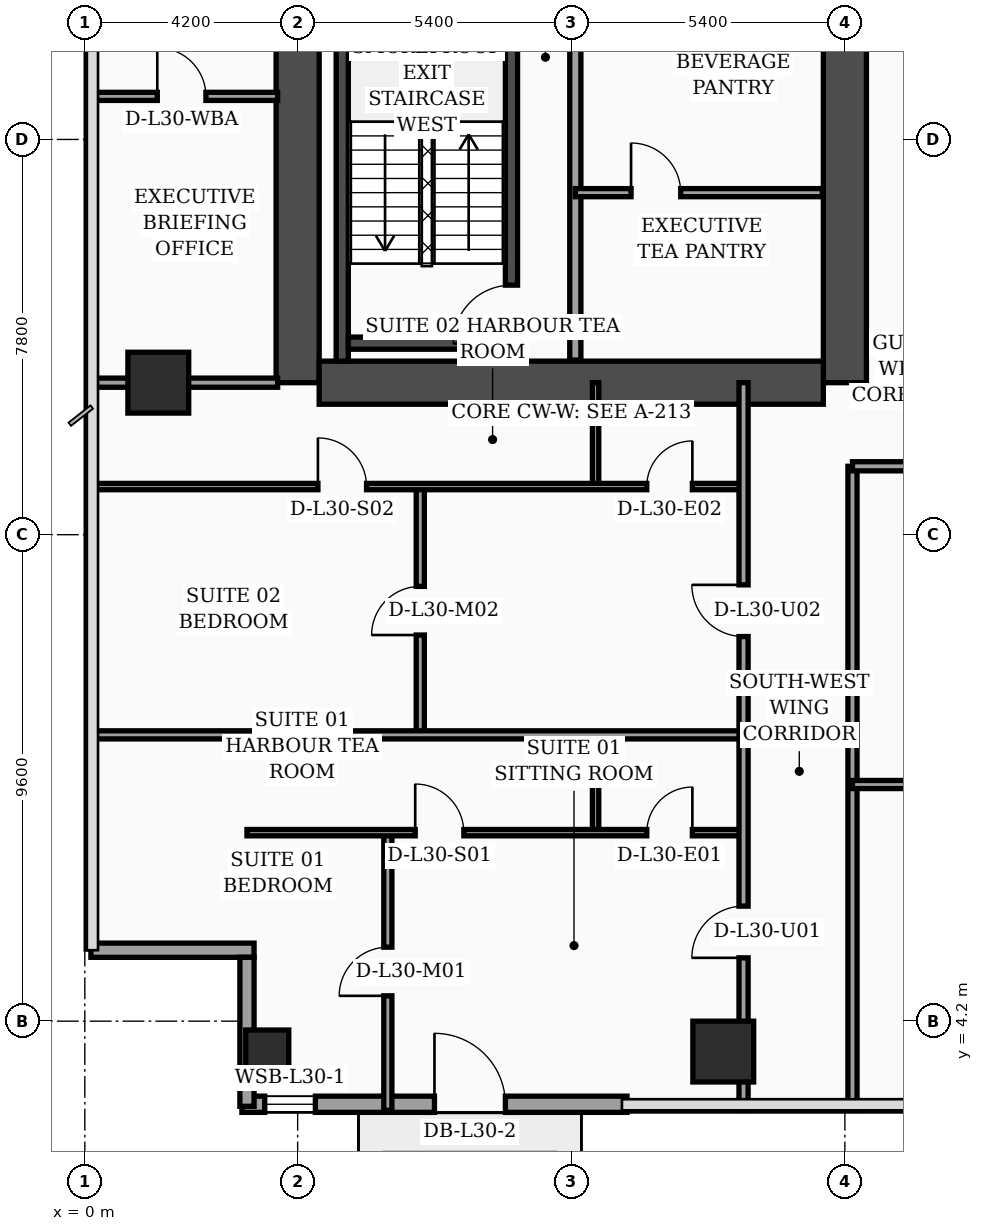
"""IFC4 building model, lengths in metres.
Left out: names, types, materials, properties, quantities, classifications, styles, units other than length and angle.
Written with IfcOpenShell. Run it as: python <this file> out.ifc"""

import sys

from ifc_helpers import new_model, si_unit, direction, frame, frame_2d, origin, origin_2d, place, context, subcontext, project, spatial, rectangle, hollow_rectangle, extrude, element, fill, save


model = new_model("IFC4")
c1 = context("Model", 3, precision=1e-05, world=origin(), true_north=direction((0.0, 1.0)))
c2 = subcontext(c1, "Body", "Model", "MODEL_VIEW")
j1 = project(units=[si_unit("LENGTHUNIT", "METRE"), si_unit("PLANEANGLEUNIT", "RADIAN")], contexts=[c1])
p1 = place(None, origin())
s1 = spatial("IfcSite", under=j1, at=p1, CompositionType="ELEMENT")
p2 = place(p1, origin())
s2 = spatial("IfcBuilding", under=s1, at=p2, CompositionType="ELEMENT")
p3 = place(p2, frame((0.0, 0.0, 124.0)))
s3 = spatial("IfcBuildingStorey", under=s2, at=p3, CompositionType="ELEMENT", Elevation=124.0)
p4 = place(p3, frame((4.2, 16.8, 0.0), z_axis=(0.0, 0.0, 1.0), x_axis=(0.0, 1.0, 0.0)))
e1 = element("IfcWall", 1, at=p4, inside=s3, PredefinedType="SHEAR", context=c2, shape_type="SweptSolid", body=[
    extrude(rectangle(XDim=21.6, YDim=0.85, at=frame_2d((10.8, 0.0))), origin(), (0.0, 0.0, 1.0), 3.56),
])
p5 = place(p3, frame((15.0, 16.8, 0.0), z_axis=(0.0, 0.0, 1.0), x_axis=(0.0, 1.0, 0.0)))
e2 = element("IfcWall", 2, at=p5, inside=s3, PredefinedType="SHEAR", context=c2, shape_type="SweptSolid", body=[
    extrude(rectangle(XDim=21.6, YDim=0.85, at=frame_2d((10.8, 0.0))), origin(), (0.0, 0.0, 1.0), 3.56),
])
p6 = place(p5, frame((8.65, 0.0, 0.0)))
e3 = element("IfcOpeningElement", 3, at=p6, cuts=e2, PredefinedType="OPENING", context=c2, shape_type="SweptSolid", body=[
    extrude(rectangle(XDim=1.1, YDim=2.2, at=frame_2d((0.55, 1.1))), frame((0.0, 0.435, 0.0), z_axis=(0.0, -1.0, 0.0), x_axis=(1.0, 0.0, 0.0)), (0.0, 0.0, 1.0), 0.87),
])
p7 = place(p5, frame((10.85, 0.0, 0.0)))
e4 = element("IfcOpeningElement", 4, at=p7, cuts=e2, PredefinedType="OPENING", context=c2, shape_type="SweptSolid", body=[
    extrude(rectangle(XDim=1.1, YDim=2.2, at=frame_2d((0.55, 1.1))), frame((0.0, 0.435, 0.0), z_axis=(0.0, -1.0, 0.0), x_axis=(1.0, 0.0, 0.0)), (0.0, 0.0, 1.0), 0.87),
])
p8 = place(p5, frame((13.5, 0.0, 0.0)))
e5 = element("IfcOpeningElement", 5, at=p8, cuts=e2, PredefinedType="OPENING", context=c2, shape_type="SweptSolid", body=[
    extrude(rectangle(XDim=1.1, YDim=2.2, at=frame_2d((0.55, 1.1))), frame((0.0, 0.435, 0.0), z_axis=(0.0, -1.0, 0.0), x_axis=(1.0, 0.0, 0.0)), (0.0, 0.0, 1.0), 0.87),
])
p9 = place(p5, frame((16.15, 0.0, 0.0)))
e6 = element("IfcOpeningElement", 6, at=p9, cuts=e2, PredefinedType="OPENING", context=c2, shape_type="SweptSolid", body=[
    extrude(rectangle(XDim=1.1, YDim=2.2, at=frame_2d((0.55, 1.1))), frame((0.0, 0.435, 0.0), z_axis=(0.0, -1.0, 0.0), x_axis=(1.0, 0.0, 0.0)), (0.0, 0.0, 1.0), 0.87),
])
p10 = place(p3, frame((4.625, 16.8, 0.0), z_axis=(0.0, 0.0, 1.0), x_axis=(1.0, 0.0, 0.0)))
e7 = element("IfcWall", 7, at=p10, inside=s3, PredefinedType="SHEAR", context=c2, shape_type="SweptSolid", body=[
    extrude(rectangle(XDim=9.95, YDim=0.85, at=frame_2d((4.975, 0.0))), origin(), (0.0, 0.0, 1.0), 3.56),
])
p11 = place(p3, frame((5.08, 17.225, 0.0), z_axis=(0.0, 0.0, 1.0), x_axis=(0.0, 1.0, 0.0)))
e8 = element("IfcWall", 8, at=p11, inside=s3, PredefinedType="SOLIDWALL", context=c2, shape_type="SweptSolid", body=[
    extrude(rectangle(XDim=9.565, YDim=0.24, at=frame_2d((4.782, 0.0))), origin(), (0.0, 0.0, 1.0), 3.56),
])
p12 = place(p3, frame((8.42, 17.225, 0.0), z_axis=(0.0, 0.0, 1.0), x_axis=(0.0, 1.0, 0.0)))
e9 = element("IfcWall", 9, at=p12, inside=s3, PredefinedType="SOLIDWALL", context=c2, shape_type="SweptSolid", body=[
    extrude(rectangle(XDim=9.565, YDim=0.24, at=frame_2d((4.782, 0.0))), origin(), (0.0, 0.0, 1.0), 3.56),
])
p13 = place(p12, frame((0.35, 0.0, 0.0)))
e10 = element("IfcOpeningElement", 10, at=p13, cuts=e9, PredefinedType="OPENING", context=c2, shape_type="SweptSolid", body=[
    extrude(rectangle(XDim=1.15, YDim=2.2, at=frame_2d((0.575, 1.1))), frame((0.0, 0.13, 0.0), z_axis=(0.0, -1.0, 0.0), x_axis=(1.0, 0.0, 0.0)), (0.0, 0.0, 1.0), 0.26),
])
p14 = place(p3, frame((5.2, 17.58, 0.0), z_axis=(0.0, 0.0, 1.0), x_axis=(1.0, 0.0, 0.0)))
e11 = element("IfcWall", 11, at=p14, inside=s3, PredefinedType="SOLIDWALL", context=c2, shape_type="SweptSolid", body=[
    extrude(rectangle(XDim=3.1, YDim=0.24, at=frame_2d((1.55, 0.0))), origin(), (0.0, 0.0, 1.0), 3.56),
])
p15 = place(p3, frame((3.6, 3.6, 0.0), z_axis=(0.0, 0.0, 1.0), x_axis=(1.0, 0.0, 0.0)))
e12 = element("IfcColumn", 12, at=p15, inside=s3, PredefinedType="COLUMN", context=c2, shape_type="SweptSolid", body=[
    extrude(hollow_rectangle(XDim=0.85, YDim=0.85, WallThickness=0.036, at=origin_2d()), origin(), (0.0, 0.0, 1.0), 3.56),
])
for number, where, z_axis, x_axis in (
    (13, (1.45, 16.8, 0.0), (0.0, 0.0, 1.0), (1.0, 0.0, 0.0)),
    (14, (12.6, 3.6, 0.0), (0.0, 0.0, 1.0), (1.0, 0.0, 0.0)),
):
    element("IfcColumn", number, at=place(p3, frame(where, z_axis=z_axis, x_axis=x_axis)), inside=s3, PredefinedType="COLUMN", context=c2, shape_type="SweptSolid", body=[
        extrude(rectangle(XDim=1.2, YDim=1.2, at=origin_2d()), origin(), (0.0, 0.0, 1.0), 3.56),
    ])
p16 = place(p3, frame((3.1, 2.56, 0.0), z_axis=(0.0, 0.0, 1.0), x_axis=(1.0, 0.0, 0.0)))
e15 = element("IfcWall", 15, at=p16, inside=s3, PredefinedType="SOLIDWALL", context=c2, shape_type="SweptSolid", body=[
    extrude(rectangle(XDim=7.6, YDim=0.32, at=frame_2d((3.8, 0.0))), origin(), (0.0, 0.0, 1.0), 3.56),
])
p17 = place(p16, frame((0.45, 0.0, 0.75)))
e16 = element("IfcOpeningElement", 16, at=p17, cuts=e15, PredefinedType="OPENING", context=c2, shape_type="SweptSolid", body=[
    extrude(rectangle(XDim=1.0, YDim=1.6, at=frame_2d((0.5, 0.8))), frame((0.0, 0.17, 0.0), z_axis=(0.0, -1.0, 0.0), x_axis=(1.0, 0.0, 0.0)), (0.0, 0.0, 1.0), 0.34),
])
p18 = place(p16, frame((3.8, 0.0, 0.0)))
e17 = element("IfcOpeningElement", 17, at=p18, cuts=e15, PredefinedType="OPENING", context=c2, shape_type="SweptSolid", body=[
    extrude(rectangle(XDim=1.4, YDim=2.25, at=frame_2d((0.7, 1.125))), frame((0.0, 0.17, 0.0), z_axis=(0.0, -1.0, 0.0), x_axis=(1.0, 0.0, 0.0)), (0.0, 0.0, 1.0), 0.34),
])
p19 = place(p3, frame((0.12, 5.6, 0.0), z_axis=(0.0, 0.0, 1.0), x_axis=(1.0, 0.0, 0.0)))
e18 = element("IfcWall", 18, at=p19, inside=s3, PredefinedType="SOLIDWALL", context=c2, shape_type="SweptSolid", body=[
    extrude(rectangle(XDim=3.22, YDim=0.28, at=frame_2d((1.61, 0.0))), origin(), (0.0, 0.0, 1.0), 2.84),
])
p20 = place(p3, frame((3.2, 5.46, 0.0), z_axis=(0.0, 0.0, 1.0), x_axis=(0.0, -1.0, 0.0)))
e19 = element("IfcWall", 19, at=p20, inside=s3, PredefinedType="SOLIDWALL", context=c2, shape_type="SweptSolid", body=[
    extrude(rectangle(XDim=2.94, YDim=0.28, at=frame_2d((1.47, 0.0))), origin(), (0.0, 0.0, 1.0), 2.84),
])
p21 = place(p3, frame((9.68, 17.245, 0.0), z_axis=(0.0, 0.0, 1.0), x_axis=(0.0, 1.0, 0.0)))
e20 = element("IfcWall", 20, at=p21, inside=s3, PredefinedType="SOLIDWALL", context=c2, shape_type="SweptSolid", body=[
    extrude(rectangle(XDim=7.755, YDim=0.22, at=frame_2d((3.877, 0.0))), origin(), (0.0, 0.0, 1.0), 3.56),
])
p22 = place(p3, frame((9.68, 20.55, 0.0), z_axis=(0.0, 0.0, 1.0), x_axis=(1.0, 0.0, 0.0)))
e21 = element("IfcWall", 21, at=p22, inside=s3, PredefinedType="PARTITIONING", context=c2, shape_type="SweptSolid", body=[
    extrude(rectangle(XDim=4.875, YDim=0.16, at=frame_2d((2.438, 0.0))), origin(), (0.0, 0.0, 1.0), 3.56),
])
p23 = place(p22, frame((1.1, 0.0, 0.0)))
e22 = element("IfcOpeningElement", 22, at=p23, cuts=e21, PredefinedType="OPENING", context=c2, shape_type="SweptSolid", body=[
    extrude(rectangle(XDim=0.98, YDim=2.15, at=frame_2d((0.49, 1.075))), frame((0.0, 0.09, 0.0), z_axis=(0.0, -1.0, 0.0), x_axis=(1.0, 0.0, 0.0)), (0.0, 0.0, 1.0), 0.18),
])
p24 = place(p3, frame((0.08, 22.45, 0.0), z_axis=(0.0, 0.0, 1.0), x_axis=(1.0, 0.0, 0.0)))
e23 = element("IfcWall", 23, at=p24, inside=s3, PredefinedType="PARTITIONING", context=c2, shape_type="SweptSolid", body=[
    extrude(rectangle(XDim=3.725, YDim=0.16, at=frame_2d((1.862, 0.0))), origin(), (0.0, 0.0, 1.0), 3.04),
])
p25 = place(p24, frame((1.35, 0.0, 0.0)))
e24 = element("IfcOpeningElement", 24, at=p25, cuts=e23, PredefinedType="OPENING", context=c2, shape_type="SweptSolid", body=[
    extrude(rectangle(XDim=0.96, YDim=2.2, at=frame_2d((0.48, 1.1))), frame((0.0, 0.09, 0.0), z_axis=(0.0, -1.0, 0.0), x_axis=(1.0, 0.0, 0.0)), (0.0, 0.0, 1.0), 0.18),
])
p26 = place(p3, frame((0.08, 16.8, 0.0), z_axis=(0.0, 0.0, 1.0), x_axis=(1.0, 0.0, 0.0)))
e25 = element("IfcWall", 25, at=p26, inside=s3, PredefinedType="PARTITIONING", context=c2, shape_type="SweptSolid", body=[
    extrude(rectangle(XDim=3.725, YDim=0.18, at=frame_2d((1.862, 0.0))), origin(), (0.0, 0.0, 1.0), 2.84),
])
p27 = place(p3, frame((10.08, 7.92, 0.0), z_axis=(0.0, 0.0, 1.0), x_axis=(0.0, 1.0, 0.0)))
e26 = element("IfcWall", 26, at=p27, inside=s3, PredefinedType="PARTITIONING", context=c2, shape_type="SweptSolid", body=[
    extrude(rectangle(XDim=1.93, YDim=0.125, at=frame_2d((0.965, 0.0))), origin(), (0.0, 0.0, 1.0), 3.09),
])
p28 = place(p3, frame((5.98, 2.44, 0.0), z_axis=(0.0, 0.0, 1.0), x_axis=(0.0, 1.0, 0.0)))
e27 = element("IfcWall", 27, at=p28, inside=s3, PredefinedType="PARTITIONING", context=c2, shape_type="SweptSolid", body=[
    extrude(rectangle(XDim=5.48, YDim=0.16, at=frame_2d((2.74, 0.0))), origin(), (0.0, 0.0, 1.0), 3.04),
])
p29 = place(p28, frame((2.26, 0.0, 0.0)))
e28 = element("IfcOpeningElement", 28, at=p29, cuts=e27, PredefinedType="OPENING", context=c2, shape_type="SweptSolid", body=[
    extrude(rectangle(XDim=0.96, YDim=2.2, at=frame_2d((0.48, 1.1))), frame((0.0, 0.09, 0.0), z_axis=(0.0, -1.0, 0.0), x_axis=(1.0, 0.0, 0.0)), (0.0, 0.0, 1.0), 0.18),
])
p30 = place(p3, frame((3.2, 7.92, 0.0), z_axis=(0.0, 0.0, 1.0), x_axis=(1.0, 0.0, 0.0)))
e29 = element("IfcWall", 29, at=p30, inside=s3, PredefinedType="PARTITIONING", context=c2, shape_type="SweptSolid", body=[
    extrude(rectangle(XDim=9.8, YDim=0.125, at=frame_2d((4.9, 0.0))), origin(), (0.0, 0.0, 1.0), 2.84),
])
p31 = place(p30, frame((3.32, 0.0, 0.0)))
e30 = element("IfcOpeningElement", 30, at=p31, cuts=e29, PredefinedType="OPENING", context=c2, shape_type="SweptSolid", body=[
    extrude(rectangle(XDim=0.96, YDim=2.2, at=frame_2d((0.48, 1.1))), frame((0.0, 0.073, 0.0), z_axis=(0.0, -1.0, 0.0), x_axis=(1.0, 0.0, 0.0)), (0.0, 0.0, 1.0), 0.145),
])
p32 = place(p30, frame((7.89, 0.0, 0.0)))
e31 = element("IfcOpeningElement", 31, at=p32, cuts=e29, PredefinedType="OPENING", context=c2, shape_type="SweptSolid", body=[
    extrude(rectangle(XDim=0.9, YDim=2.15, at=frame_2d((0.45, 1.075))), frame((0.0, 0.073, 0.0), z_axis=(0.0, -1.0, 0.0), x_axis=(1.0, 0.0, 0.0)), (0.0, 0.0, 1.0), 0.145),
])
p33 = place(p3, frame((10.08, 14.75, 0.0), z_axis=(0.0, 0.0, 1.0), x_axis=(0.0, 1.0, 0.0)))
e32 = element("IfcWall", 32, at=p33, inside=s3, PredefinedType="PARTITIONING", context=c2, shape_type="SweptSolid", body=[
    extrude(rectangle(XDim=2.05, YDim=0.125, at=frame_2d((1.025, 0.0))), origin(), (0.0, 0.0, 1.0), 3.56),
])
p34 = place(p3, frame((6.62, 9.85, 0.0), z_axis=(0.0, 0.0, 1.0), x_axis=(0.0, 1.0, 0.0)))
e33 = element("IfcWall", 33, at=p34, inside=s3, PredefinedType="PARTITIONING", context=c2, shape_type="SweptSolid", body=[
    extrude(rectangle(XDim=4.9, YDim=0.16, at=frame_2d((2.45, 0.0))), origin(), (0.0, 0.0, 1.0), 3.14),
])
p35 = place(p34, frame((1.97, 0.0, 0.0)))
e34 = element("IfcOpeningElement", 34, at=p35, cuts=e33, PredefinedType="OPENING", context=c2, shape_type="SweptSolid", body=[
    extrude(rectangle(XDim=0.96, YDim=2.2, at=frame_2d((0.48, 1.1))), frame((0.0, 0.09, 0.0), z_axis=(0.0, -1.0, 0.0), x_axis=(1.0, 0.0, 0.0)), (0.0, 0.0, 1.0), 0.18),
])
p36 = place(p3, frame((0.08, 14.75, 0.0), z_axis=(0.0, 0.0, 1.0), x_axis=(1.0, 0.0, 0.0)))
e35 = element("IfcWall", 35, at=p36, inside=s3, PredefinedType="PARTITIONING", context=c2, shape_type="SweptSolid", body=[
    extrude(rectangle(XDim=12.92, YDim=0.125, at=frame_2d((6.46, 0.0))), origin(), (0.0, 0.0, 1.0), 2.84),
])
p37 = place(p36, frame((4.52, 0.0, 0.0)))
e36 = element("IfcOpeningElement", 36, at=p37, cuts=e35, PredefinedType="OPENING", context=c2, shape_type="SweptSolid", body=[
    extrude(rectangle(XDim=0.96, YDim=2.2, at=frame_2d((0.48, 1.1))), frame((0.0, 0.073, 0.0), z_axis=(0.0, -1.0, 0.0), x_axis=(1.0, 0.0, 0.0)), (0.0, 0.0, 1.0), 0.145),
])
p38 = place(p36, frame((11.01, 0.0, 0.0)))
e37 = element("IfcOpeningElement", 37, at=p38, cuts=e35, PredefinedType="OPENING", context=c2, shape_type="SweptSolid", body=[
    extrude(rectangle(XDim=0.9, YDim=2.15, at=frame_2d((0.45, 1.075))), frame((0.0, 0.073, 0.0), z_axis=(0.0, -1.0, 0.0), x_axis=(1.0, 0.0, 0.0)), (0.0, 0.0, 1.0), 0.145),
])
p39 = place(p3, frame((0.08, 9.85, 0.0), z_axis=(0.0, 0.0, 1.0), x_axis=(1.0, 0.0, 0.0)))
e38 = element("IfcWall", 38, at=p39, inside=s3, PredefinedType="PARTITIONING", context=c2, shape_type="SweptSolid", body=[
    extrude(rectangle(XDim=12.92, YDim=0.16, at=frame_2d((6.46, 0.0))), origin(), (0.0, 0.0, 1.0), 2.84),
])
p40 = place(p3, frame((13.0, 2.44, 0.0), z_axis=(0.0, 0.0, 1.0), x_axis=(0.0, 1.0, 0.0)))
e39 = element("IfcWall", 39, at=p40, inside=s3, PredefinedType="PARTITIONING", context=c2, shape_type="SweptSolid", body=[
    extrude(rectangle(XDim=14.36, YDim=0.18, at=frame_2d((7.18, 0.0))), origin(), (0.0, 0.0, 1.0), 2.84),
])
p41 = place(p40, frame((3.01, 0.0, 0.0)))
e40 = element("IfcOpeningElement", 40, at=p41, cuts=e39, PredefinedType="OPENING", context=c2, shape_type="SweptSolid", body=[
    extrude(rectangle(XDim=1.02, YDim=2.2, at=frame_2d((0.51, 1.1))), frame((0.0, 0.1, 0.0), z_axis=(0.0, -1.0, 0.0), x_axis=(1.0, 0.0, 0.0)), (0.0, 0.0, 1.0), 0.2),
])
p42 = place(p40, frame((9.35, 0.0, 0.0)))
e41 = element("IfcOpeningElement", 41, at=p42, cuts=e39, PredefinedType="OPENING", context=c2, shape_type="SweptSolid", body=[
    extrude(rectangle(XDim=1.02, YDim=2.2, at=frame_2d((0.51, 1.1))), frame((0.0, 0.1, 0.0), z_axis=(0.0, -1.0, 0.0), x_axis=(1.0, 0.0, 0.0)), (0.0, 0.0, 1.0), 0.2),
])
p43 = place(p3, frame((15.15, 2.44, 0.0), z_axis=(0.0, 0.0, 1.0), x_axis=(0.0, 1.0, 0.0)))
e42 = element("IfcWall", 42, at=p43, inside=s3, PredefinedType="PARTITIONING", context=c2, shape_type="SweptSolid", body=[
    extrude(rectangle(XDim=12.71, YDim=0.18, at=frame_2d((6.355, 0.0))), origin(), (0.0, 0.0, 1.0), 3.04),
])
p44 = place(p3, frame((15.15, 8.87, 0.0), z_axis=(0.0, 0.0, 1.0), x_axis=(1.0, 0.0, 0.0)))
e43 = element("IfcWall", 43, at=p44, inside=s3, PredefinedType="PARTITIONING", context=c2, shape_type="SweptSolid", body=[
    extrude(rectangle(XDim=4.45, YDim=0.16, at=frame_2d((2.225, 0.0))), origin(), (0.0, 0.0, 1.0), 3.56),
])
p45 = place(p44, frame((1.75, 0.0, 0.0)))
e44 = element("IfcOpeningElement", 44, at=p45, cuts=e43, PredefinedType="OPENING", context=c2, shape_type="SweptSolid", body=[
    extrude(rectangle(XDim=0.96, YDim=2.2, at=frame_2d((0.48, 1.1))), frame((0.0, 0.09, 0.0), z_axis=(0.0, -1.0, 0.0), x_axis=(1.0, 0.0, 0.0)), (0.0, 0.0, 1.0), 0.18),
])
p46 = place(p3, frame((15.15, 15.15, 0.0), z_axis=(0.0, 0.0, 1.0), x_axis=(1.0, 0.0, 0.0)))
e45 = element("IfcWall", 45, at=p46, inside=s3, PredefinedType="PARTITIONING", context=c2, shape_type="SweptSolid", body=[
    extrude(rectangle(XDim=6.45, YDim=0.18, at=frame_2d((3.225, 0.0))), origin(), (0.0, 0.0, 1.0), 2.49),
])
p47 = place(p46, frame((1.74, 0.0, 0.0)))
e46 = element("IfcOpeningElement", 46, at=p47, cuts=e45, PredefinedType="OPENING", context=c2, shape_type="SweptSolid", body=[
    extrude(rectangle(XDim=1.02, YDim=2.2, at=frame_2d((0.51, 1.1))), frame((0.0, 0.1, 0.0), z_axis=(0.0, -1.0, 0.0), x_axis=(1.0, 0.0, 0.0)), (0.0, 0.0, 1.0), 0.2),
])
p48 = place(p17, origin())
e47 = element("IfcWindow", 47, at=p48, inside=s3, PartitioningType="SINGLE_PANEL", PredefinedType="WINDOW", context=c2, shape_type="SweptSolid", body=[
    extrude(rectangle(XDim=1.0, YDim=1.6, at=frame_2d((0.5, 0.8))), frame((0.0, 0.03, 0.0), z_axis=(0.0, -1.0, 0.0), x_axis=(1.0, 0.0, 0.0)), (0.0, 0.0, 1.0), 0.06),
])
fill(e16, e47)
p49 = place(p18, origin())
e48 = element("IfcDoor", 48, at=p49, inside=s3, OperationType="SINGLE_SWING_LEFT", PredefinedType="DOOR", context=c2, shape_type="SweptSolid", body=[
    extrude(rectangle(XDim=1.4, YDim=2.25, at=frame_2d((0.7, 1.125))), frame((0.0, 0.025, 0.0), z_axis=(0.0, -1.0, 0.0), x_axis=(1.0, 0.0, 0.0)), (0.0, 0.0, 1.0), 0.05),
])
fill(e17, e48)
p50 = place(p23, origin())
e49 = element("IfcDoor", 49, at=p50, inside=s3, OperationType="SINGLE_SWING_LEFT", PredefinedType="DOOR", context=c2, shape_type="SweptSolid", body=[
    extrude(rectangle(XDim=0.98, YDim=2.15, at=frame_2d((0.49, 1.075))), frame((0.0, 0.025, 0.0), z_axis=(0.0, -1.0, 0.0), x_axis=(1.0, 0.0, 0.0)), (0.0, 0.0, 1.0), 0.05),
])
fill(e22, e49)
p51 = place(p25, origin())
e50 = element("IfcDoor", 50, at=p51, inside=s3, OperationType="SINGLE_SWING_LEFT", PredefinedType="DOOR", context=c2, shape_type="SweptSolid", body=[
    extrude(rectangle(XDim=0.96, YDim=2.2, at=frame_2d((0.48, 1.1))), frame((0.0, 0.025, 0.0), z_axis=(0.0, -1.0, 0.0), x_axis=(1.0, 0.0, 0.0)), (0.0, 0.0, 1.0), 0.05),
])
fill(e24, e50)
p52 = place(p29, origin())
e51 = element("IfcDoor", 51, at=p52, inside=s3, OperationType="SINGLE_SWING_LEFT", PredefinedType="DOOR", context=c2, shape_type="SweptSolid", body=[
    extrude(rectangle(XDim=0.96, YDim=2.2, at=frame_2d((0.48, 1.1))), frame((0.0, 0.025, 0.0), z_axis=(0.0, -1.0, 0.0), x_axis=(1.0, 0.0, 0.0)), (0.0, 0.0, 1.0), 0.05),
])
fill(e28, e51)
p53 = place(p31, origin())
e52 = element("IfcDoor", 52, at=p53, inside=s3, OperationType="SINGLE_SWING_LEFT", PredefinedType="DOOR", context=c2, shape_type="SweptSolid", body=[
    extrude(rectangle(XDim=0.96, YDim=2.2, at=frame_2d((0.48, 1.1))), frame((0.0, 0.025, 0.0), z_axis=(0.0, -1.0, 0.0), x_axis=(1.0, 0.0, 0.0)), (0.0, 0.0, 1.0), 0.05),
])
fill(e30, e52)
p54 = place(p32, origin())
e53 = element("IfcDoor", 53, at=p54, inside=s3, OperationType="SINGLE_SWING_RIGHT", PredefinedType="DOOR", context=c2, shape_type="SweptSolid", body=[
    extrude(rectangle(XDim=0.9, YDim=2.15, at=frame_2d((0.45, 1.075))), frame((0.0, 0.025, 0.0), z_axis=(0.0, -1.0, 0.0), x_axis=(1.0, 0.0, 0.0)), (0.0, 0.0, 1.0), 0.05),
])
fill(e31, e53)
p55 = place(p35, origin())
e54 = element("IfcDoor", 54, at=p55, inside=s3, OperationType="SINGLE_SWING_LEFT", PredefinedType="DOOR", context=c2, shape_type="SweptSolid", body=[
    extrude(rectangle(XDim=0.96, YDim=2.2, at=frame_2d((0.48, 1.1))), frame((0.0, 0.025, 0.0), z_axis=(0.0, -1.0, 0.0), x_axis=(1.0, 0.0, 0.0)), (0.0, 0.0, 1.0), 0.05),
])
fill(e34, e54)
p56 = place(p37, origin())
e55 = element("IfcDoor", 55, at=p56, inside=s3, OperationType="SINGLE_SWING_LEFT", PredefinedType="DOOR", context=c2, shape_type="SweptSolid", body=[
    extrude(rectangle(XDim=0.96, YDim=2.2, at=frame_2d((0.48, 1.1))), frame((0.0, 0.025, 0.0), z_axis=(0.0, -1.0, 0.0), x_axis=(1.0, 0.0, 0.0)), (0.0, 0.0, 1.0), 0.05),
])
fill(e36, e55)
p57 = place(p38, origin())
e56 = element("IfcDoor", 56, at=p57, inside=s3, OperationType="SINGLE_SWING_RIGHT", PredefinedType="DOOR", context=c2, shape_type="SweptSolid", body=[
    extrude(rectangle(XDim=0.9, YDim=2.15, at=frame_2d((0.45, 1.075))), frame((0.0, 0.025, 0.0), z_axis=(0.0, -1.0, 0.0), x_axis=(1.0, 0.0, 0.0)), (0.0, 0.0, 1.0), 0.05),
])
fill(e37, e56)
p58 = place(p41, origin())
e57 = element("IfcDoor", 57, at=p58, inside=s3, OperationType="SINGLE_SWING_LEFT", PredefinedType="DOOR", context=c2, shape_type="SweptSolid", body=[
    extrude(rectangle(XDim=1.02, YDim=2.2, at=frame_2d((0.51, 1.1))), frame((0.0, 0.025, 0.0), z_axis=(0.0, -1.0, 0.0), x_axis=(1.0, 0.0, 0.0)), (0.0, 0.0, 1.0), 0.05),
])
fill(e40, e57)
p59 = place(p42, origin())
e58 = element("IfcDoor", 58, at=p59, inside=s3, OperationType="SINGLE_SWING_RIGHT", PredefinedType="DOOR", context=c2, shape_type="SweptSolid", body=[
    extrude(rectangle(XDim=1.02, YDim=2.2, at=frame_2d((0.51, 1.1))), frame((0.0, 0.025, 0.0), z_axis=(0.0, -1.0, 0.0), x_axis=(1.0, 0.0, 0.0)), (0.0, 0.0, 1.0), 0.05),
])
fill(e41, e58)
p60 = place(p13, origin())
e59 = element("IfcDoor", 59, at=p60, inside=s3, OperationType="SINGLE_SWING_LEFT", PredefinedType="DOOR", context=c2, shape_type="SweptSolid", body=[
    extrude(rectangle(XDim=1.15, YDim=2.2, at=frame_2d((0.575, 1.1))), frame((0.0, 0.025, 0.0), z_axis=(0.0, -1.0, 0.0), x_axis=(1.0, 0.0, 0.0)), (0.0, 0.0, 1.0), 0.05),
])
fill(e10, e59)
save(model, sys.argv[1])
